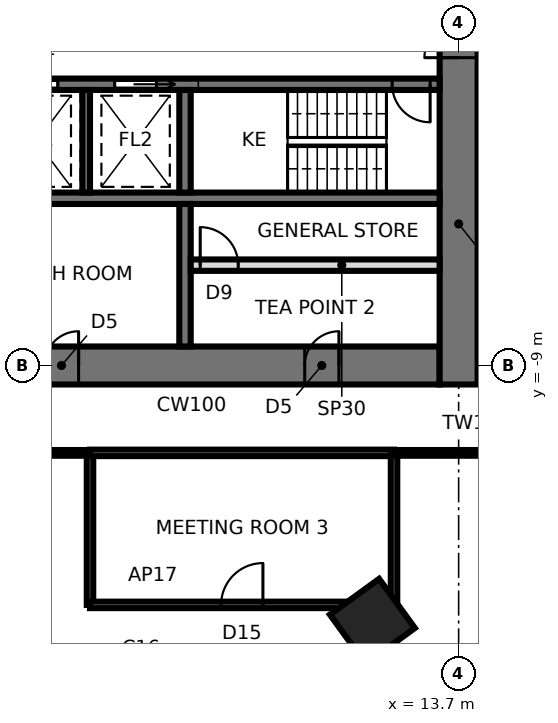
"""IFC4 building model, lengths in metres.
Left out: names, types, materials, properties, quantities, classifications, styles, units other than length and angle.
Written with IfcOpenShell. Run it as: python <this file> out.ifc"""

import sys

from ifc_helpers import new_model, si_unit, direction, frame, frame_2d, origin, origin_2d, place, context, subcontext, project, spatial, rectangle, extrude, element, fill, save


model = new_model("IFC4")
c1 = context("Model", 3, precision=1e-05, world=origin(), true_north=direction((0.0, 1.0)))
c2 = subcontext(c1, "Body", "Model", "MODEL_VIEW")
j1 = project(units=[si_unit("LENGTHUNIT", "METRE"), si_unit("PLANEANGLEUNIT", "RADIAN")], contexts=[c1])
p1 = place(None, origin())
s1 = spatial("IfcSite", under=j1, at=p1, CompositionType="ELEMENT")
p2 = place(p1, origin())
s2 = spatial("IfcBuilding", under=s1, at=p2, CompositionType="ELEMENT")
p3 = place(p2, frame((0.0, 0.0, 127.5)))
s3 = spatial("IfcBuildingStorey", under=s2, at=p3, CompositionType="ELEMENT", Elevation=127.5)
p4 = place(p3, frame((11.43, -15.733, 0.0), z_axis=(0.0, 0.0, 1.0), x_axis=(0.587785252292, -0.809016994375, 0.0)))
e1 = element("IfcColumn", 1, at=p4, inside=s3, PredefinedType="COLUMN", context=c2, shape_type="SweptSolid", body=[
    extrude(rectangle(XDim=1.6, YDim=1.6, at=origin_2d()), origin(), (0.0, 0.0, 1.0), 3.9),
])
p5 = place(p3, frame((-13.2, -9.0, 0.0), z_axis=(0.0, 0.0, 1.0), x_axis=(1.0, 0.0, 0.0)))
e2 = element("IfcWall", 2, at=p5, inside=s3, PredefinedType="SHEAR", context=c2, shape_type="SweptSolid", body=[
    extrude(rectangle(XDim=26.4, YDim=1.0, at=frame_2d((13.2, 0.0))), origin(), (0.0, 0.0, 1.0), 3.9),
])
p6 = place(p5, frame((2.65, 0.0, 0.0)))
e3 = element("IfcOpeningElement", 3, at=p6, cuts=e2, PredefinedType="OPENING", context=c2, shape_type="SweptSolid", body=[
    extrude(rectangle(XDim=0.9, YDim=2.1, at=frame_2d((0.45, 1.05))), frame((0.0, 0.51, 0.0), z_axis=(0.0, -1.0, 0.0), x_axis=(1.0, 0.0, 0.0)), (0.0, 0.0, 1.0), 1.02),
])
p7 = place(p5, frame((9.5, 0.0, 0.0)))
e4 = element("IfcOpeningElement", 4, at=p7, cuts=e2, PredefinedType="OPENING", context=c2, shape_type="SweptSolid", body=[
    extrude(rectangle(XDim=0.9, YDim=2.1, at=frame_2d((0.45, 1.05))), frame((0.0, 0.51, 0.0), z_axis=(0.0, -1.0, 0.0), x_axis=(1.0, 0.0, 0.0)), (0.0, 0.0, 1.0), 1.02),
])
p8 = place(p5, frame((16.0, 0.0, 0.0)))
e5 = element("IfcOpeningElement", 5, at=p8, cuts=e2, PredefinedType="OPENING", context=c2, shape_type="SweptSolid", body=[
    extrude(rectangle(XDim=0.9, YDim=2.1, at=frame_2d((0.45, 1.05))), frame((0.0, 0.51, 0.0), z_axis=(0.0, -1.0, 0.0), x_axis=(1.0, 0.0, 0.0)), (0.0, 0.0, 1.0), 1.02),
])
p9 = place(p5, frame((22.85, 0.0, 0.0)))
e6 = element("IfcOpeningElement", 6, at=p9, cuts=e2, PredefinedType="OPENING", context=c2, shape_type="SweptSolid", body=[
    extrude(rectangle(XDim=0.9, YDim=2.1, at=frame_2d((0.45, 1.05))), frame((0.0, 0.51, 0.0), z_axis=(0.0, -1.0, 0.0), x_axis=(1.0, 0.0, 0.0)), (0.0, 0.0, 1.0), 1.02),
])
p10 = place(p3, frame((13.7, -9.5, 0.0), z_axis=(0.0, 0.0, 1.0), x_axis=(0.0, 1.0, 0.0)))
e7 = element("IfcWall", 7, at=p10, inside=s3, PredefinedType="SHEAR", context=c2, shape_type="SweptSolid", body=[
    extrude(rectangle(XDim=19.0, YDim=1.0, at=frame_2d((9.5, 0.0))), origin(), (0.0, 0.0, 1.0), 3.9),
])
p11 = place(p10, frame((8.6, 0.0, 0.0)))
e8 = element("IfcOpeningElement", 8, at=p11, cuts=e7, PredefinedType="OPENING", context=c2, shape_type="SweptSolid", body=[
    extrude(rectangle(XDim=1.8, YDim=2.4, at=frame_2d((0.9, 1.2))), frame((0.0, 0.51, 0.0), z_axis=(0.0, -1.0, 0.0), x_axis=(1.0, 0.0, 0.0)), (0.0, 0.0, 1.0), 1.02),
])
p12 = place(p3, frame((-13.2, -1.6, 0.0), z_axis=(0.0, 0.0, 1.0), x_axis=(1.0, 0.0, 0.0)))
e9 = element("IfcWall", 9, at=p12, inside=s3, PredefinedType="SHEAR", context=c2, shape_type="SweptSolid", body=[
    extrude(rectangle(XDim=26.4, YDim=0.3, at=frame_2d((13.2, 0.0))), origin(), (0.0, 0.0, 1.0), 3.9),
])
p13 = place(p12, frame((25.15, 0.0, 0.0)))
e10 = element("IfcOpeningElement", 10, at=p13, cuts=e9, PredefinedType="OPENING", context=c2, shape_type="SweptSolid", body=[
    extrude(rectangle(XDim=1.0, YDim=2.1, at=frame_2d((0.5, 1.05))), frame((0.0, 0.16, 0.0), z_axis=(0.0, -1.0, 0.0), x_axis=(1.0, 0.0, 0.0)), (0.0, 0.0, 1.0), 0.32),
])
p14 = place(p12, frame((7.45, 0.0, 0.0)))
e11 = element("IfcOpeningElement", 11, at=p14, cuts=e9, PredefinedType="OPENING", context=c2, shape_type="SweptSolid", body=[
    extrude(rectangle(XDim=1.1, YDim=2.3, at=frame_2d((0.55, 1.15))), frame((0.0, 0.16, 0.0), z_axis=(0.0, -1.0, 0.0), x_axis=(1.0, 0.0, 0.0)), (0.0, 0.0, 1.0), 0.32),
])
p15 = place(p12, frame((10.05, 0.0, 0.0)))
e12 = element("IfcOpeningElement", 12, at=p15, cuts=e9, PredefinedType="OPENING", context=c2, shape_type="SweptSolid", body=[
    extrude(rectangle(XDim=1.1, YDim=2.3, at=frame_2d((0.55, 1.15))), frame((0.0, 0.16, 0.0), z_axis=(0.0, -1.0, 0.0), x_axis=(1.0, 0.0, 0.0)), (0.0, 0.0, 1.0), 0.32),
])
p16 = place(p12, frame((12.65, 0.0, 0.0)))
e13 = element("IfcOpeningElement", 13, at=p16, cuts=e9, PredefinedType="OPENING", context=c2, shape_type="SweptSolid", body=[
    extrude(rectangle(XDim=1.1, YDim=2.3, at=frame_2d((0.55, 1.15))), frame((0.0, 0.16, 0.0), z_axis=(0.0, -1.0, 0.0), x_axis=(1.0, 0.0, 0.0)), (0.0, 0.0, 1.0), 0.32),
])
p17 = place(p12, frame((15.25, 0.0, 0.0)))
e14 = element("IfcOpeningElement", 14, at=p17, cuts=e9, PredefinedType="OPENING", context=c2, shape_type="SweptSolid", body=[
    extrude(rectangle(XDim=1.1, YDim=2.3, at=frame_2d((0.55, 1.15))), frame((0.0, 0.16, 0.0), z_axis=(0.0, -1.0, 0.0), x_axis=(1.0, 0.0, 0.0)), (0.0, 0.0, 1.0), 0.32),
])
p18 = place(p12, frame((17.85, 0.0, 0.0)))
e15 = element("IfcOpeningElement", 15, at=p18, cuts=e9, PredefinedType="OPENING", context=c2, shape_type="SweptSolid", body=[
    extrude(rectangle(XDim=1.1, YDim=2.3, at=frame_2d((0.55, 1.15))), frame((0.0, 0.16, 0.0), z_axis=(0.0, -1.0, 0.0), x_axis=(1.0, 0.0, 0.0)), (0.0, 0.0, 1.0), 0.32),
])
p19 = place(p12, frame((5.55, 0.0, 0.0)))
e16 = element("IfcOpeningElement", 16, at=p19, cuts=e9, PredefinedType="OPENING", context=c2, shape_type="SweptSolid", body=[
    extrude(rectangle(XDim=0.9, YDim=2.1, at=frame_2d((0.45, 1.05))), frame((0.0, 0.16, 0.0), z_axis=(0.0, -1.0, 0.0), x_axis=(1.0, 0.0, 0.0)), (0.0, 0.0, 1.0), 0.32),
])
p20 = place(p3, frame((-13.2, -4.6, 0.0), z_axis=(0.0, 0.0, 1.0), x_axis=(1.0, 0.0, 0.0)))
e17 = element("IfcWall", 17, at=p20, inside=s3, PredefinedType="SHEAR", context=c2, shape_type="SweptSolid", body=[
    extrude(rectangle(XDim=26.4, YDim=0.3, at=frame_2d((13.2, 0.0))), origin(), (0.0, 0.0, 1.0), 3.9),
])
p21 = place(p3, frame((6.5, -1.75, 0.0), z_axis=(0.0, 0.0, 1.0), x_axis=(0.0, -1.0, 0.0)))
e18 = element("IfcWall", 18, at=p21, inside=s3, PredefinedType="SHEAR", context=c2, shape_type="SweptSolid", body=[
    extrude(rectangle(XDim=2.7, YDim=0.3, at=frame_2d((1.35, 0.0))), origin(), (0.0, 0.0, 1.0), 3.9),
])
p22 = place(p3, frame((6.5, -4.75, 0.0), z_axis=(0.0, 0.0, 1.0), x_axis=(0.0, -1.0, 0.0)))
e19 = element("IfcWall", 19, at=p22, inside=s3, PredefinedType="SHEAR", context=c2, shape_type="SweptSolid", body=[
    extrude(rectangle(XDim=3.75, YDim=0.3, at=frame_2d((1.875, 0.0))), origin(), (0.0, 0.0, 1.0), 3.9),
])
p23 = place(p3, frame((3.9, -1.75, 0.0), z_axis=(0.0, 0.0, 1.0), x_axis=(0.0, -1.0, 0.0)))
e20 = element("IfcWall", 20, at=p23, inside=s3, PredefinedType="SHEAR", context=c2, shape_type="SweptSolid", body=[
    extrude(rectangle(XDim=2.7, YDim=0.2, at=frame_2d((1.35, 0.0))), origin(), (0.0, 0.0, 1.0), 3.9),
])
p24 = place(p3, frame((6.65, -6.36, 0.0), z_axis=(0.0, 0.0, 1.0), x_axis=(1.0, 0.0, 0.0)))
e21 = element("IfcWall", 21, at=p24, inside=s3, PredefinedType="PARTITIONING", context=c2, shape_type="SweptSolid", body=[
    extrude(rectangle(XDim=6.55, YDim=0.3, at=frame_2d((3.275, 0.0))), origin(), (0.0, 0.0, 1.0), 3.74),
])
p25 = place(p24, frame((0.25, 0.0, 0.0)))
e22 = element("IfcOpeningElement", 22, at=p25, cuts=e21, PredefinedType="OPENING", context=c2, shape_type="SweptSolid", body=[
    extrude(rectangle(XDim=1.0, YDim=2.4, at=frame_2d((0.5, 1.2))), frame((0.0, 0.16, 0.0), z_axis=(0.0, -1.0, 0.0), x_axis=(1.0, 0.0, 0.0)), (0.0, 0.0, 1.0), 0.32),
])
p26 = place(p3, frame((0.5, -11.3, 0.0), z_axis=(0.0, 0.0, 1.0), x_axis=(1.0, 0.0, 0.0)))
e23 = element("IfcWall", 23, at=p26, inside=s3, PredefinedType="PARTITIONING", context=c2, shape_type="SweptSolid", body=[
    extrude(rectangle(XDim=3.5, YDim=0.15, at=frame_2d((1.75, 0.0))), origin(), (0.0, 0.0, 1.0), 3.74),
])
p27 = place(p3, frame((4.0, -11.3, 0.0), z_axis=(0.0, 0.0, 1.0), x_axis=(0.0, -1.0, 0.0)))
e24 = element("IfcWall", 24, at=p27, inside=s3, PredefinedType="PARTITIONING", context=c2, shape_type="SweptSolid", body=[
    extrude(rectangle(XDim=4.0, YDim=0.17, at=frame_2d((2.0, 0.0))), origin(), (0.0, 0.0, 1.0), 3.74),
])
p28 = place(p3, frame((4.0, -15.3, 0.0), z_axis=(0.0, 0.0, 1.0), x_axis=(1.0, 0.0, 0.0)))
e25 = element("IfcWall", 25, at=p28, inside=s3, PredefinedType="PARTITIONING", context=c2, shape_type="SweptSolid", body=[
    extrude(rectangle(XDim=8.0, YDim=0.17, at=frame_2d((4.0, 0.0))), origin(), (0.0, 0.0, 1.0), 3.286),
])
p29 = place(p28, frame((3.45, 0.0, 0.0)))
e26 = element("IfcOpeningElement", 26, at=p29, cuts=e25, PredefinedType="OPENING", context=c2, shape_type="SweptSolid", body=[
    extrude(rectangle(XDim=1.1, YDim=2.4, at=frame_2d((0.55, 1.2))), frame((0.0, 0.095, 0.0), z_axis=(0.0, -1.0, 0.0), x_axis=(1.0, 0.0, 0.0)), (0.0, 0.0, 1.0), 0.19),
])
p30 = place(p3, frame((12.0, -11.3, 0.0), z_axis=(0.0, 0.0, 1.0), x_axis=(-1.0, 0.0, 0.0)))
e27 = element("IfcWall", 27, at=p30, inside=s3, PredefinedType="PARTITIONING", context=c2, shape_type="SweptSolid", body=[
    extrude(rectangle(XDim=8.0, YDim=0.17, at=frame_2d((4.0, 0.0))), origin(), (0.0, 0.0, 1.0), 3.74),
])
p31 = place(p3, frame((12.0, -15.3, 0.0), z_axis=(0.0, 0.0, 1.0), x_axis=(0.0, 1.0, 0.0)))
e28 = element("IfcWall", 28, at=p31, inside=s3, PredefinedType="PARTITIONING", context=c2, shape_type="SweptSolid", body=[
    extrude(rectangle(XDim=4.0, YDim=0.17, at=frame_2d((2.0, 0.0))), origin(), (0.0, 0.0, 1.0), 3.74),
])
p32 = place(p3, frame((12.0, -11.3, 0.0), z_axis=(0.0, 0.0, 1.0), x_axis=(1.0, 0.0, 0.0)))
e29 = element("IfcWall", 29, at=p32, inside=s3, PredefinedType="PARTITIONING", context=c2, shape_type="SweptSolid", body=[
    extrude(rectangle(XDim=4.0, YDim=0.15, at=frame_2d((2.0, 0.0))), origin(), (0.0, 0.0, 1.0), 3.74),
])
p33 = place(p11, origin())
e30 = element("IfcDoor", 30, at=p33, inside=s3, OperationType="DOUBLE_DOOR_SINGLE_SWING", PredefinedType="DOOR", context=c2, shape_type="SweptSolid", body=[
    extrude(rectangle(XDim=1.72, YDim=2.36, at=frame_2d((0.9, 1.18))), frame((0.0, 0.025, 0.0), z_axis=(0.0, -1.0, 0.0), x_axis=(1.0, 0.0, 0.0)), (0.0, 0.0, 1.0), 0.05),
    extrude(rectangle(XDim=0.04, YDim=2.4, at=frame_2d((0.02, 1.2))), frame((0.0, 0.25, 0.0), z_axis=(0.0, -1.0, 0.0), x_axis=(1.0, 0.0, 0.0)), (0.0, 0.0, 1.0), 0.5),
    extrude(rectangle(XDim=0.04, YDim=2.4, at=frame_2d((1.78, 1.2))), frame((0.0, 0.25, 0.0), z_axis=(0.0, -1.0, 0.0), x_axis=(1.0, 0.0, 0.0)), (0.0, 0.0, 1.0), 0.5),
    extrude(rectangle(XDim=1.72, YDim=0.04, at=frame_2d((0.9, 2.38))), frame((0.0, 0.25, 0.0), z_axis=(0.0, -1.0, 0.0), x_axis=(1.0, 0.0, 0.0)), (0.0, 0.0, 1.0), 0.5),
])
fill(e8, e30)
p34 = place(p13, frame((1.0, 0.0, 0.0), z_axis=(0.0, 0.0, 1.0), x_axis=(-1.0, 0.0, 0.0)))
e31 = element("IfcDoor", 31, at=p34, inside=s3, OperationType="SINGLE_SWING_LEFT", PredefinedType="DOOR", context=c2, shape_type="SweptSolid", body=[
    extrude(rectangle(XDim=1.0, YDim=2.1, at=frame_2d((0.5, 1.05))), frame((0.0, 0.025, 0.0), z_axis=(0.0, -1.0, 0.0), x_axis=(1.0, 0.0, 0.0)), (0.0, 0.0, 1.0), 0.05),
])
fill(e10, e31)
p35 = place(p17, frame((1.1, 0.0, 0.0), z_axis=(0.0, 0.0, 1.0), x_axis=(-1.0, 0.0, 0.0)))
e32 = element("IfcDoor", 32, at=p35, inside=s3, OperationType="SLIDING_TO_RIGHT", PredefinedType="DOOR", context=c2, shape_type="SweptSolid", body=[
    extrude(rectangle(XDim=1.1, YDim=2.3, at=frame_2d((0.55, 1.15))), frame((0.0, 0.025, 0.0), z_axis=(0.0, -1.0, 0.0), x_axis=(1.0, 0.0, 0.0)), (0.0, 0.0, 1.0), 0.05),
])
fill(e14, e32)
p36 = place(p18, frame((1.1, 0.0, 0.0), z_axis=(0.0, 0.0, 1.0), x_axis=(-1.0, 0.0, 0.0)))
e33 = element("IfcDoor", 33, at=p36, inside=s3, OperationType="SLIDING_TO_LEFT", PredefinedType="DOOR", context=c2, shape_type="SweptSolid", body=[
    extrude(rectangle(XDim=1.1, YDim=2.3, at=frame_2d((0.55, 1.15))), frame((0.0, 0.025, 0.0), z_axis=(0.0, -1.0, 0.0), x_axis=(1.0, 0.0, 0.0)), (0.0, 0.0, 1.0), 0.05),
])
fill(e15, e33)
p37 = place(p8, origin())
e34 = element("IfcDoor", 34, at=p37, inside=s3, OperationType="SINGLE_SWING_RIGHT", PredefinedType="DOOR", context=c2, shape_type="SweptSolid", body=[
    extrude(rectangle(XDim=0.82, YDim=2.06, at=frame_2d((0.45, 1.03))), frame((0.0, 0.025, 0.0), z_axis=(0.0, -1.0, 0.0), x_axis=(1.0, 0.0, 0.0)), (0.0, 0.0, 1.0), 0.05),
    extrude(rectangle(XDim=0.04, YDim=2.1, at=frame_2d((0.02, 1.05))), frame((0.0, 0.25, 0.0), z_axis=(0.0, -1.0, 0.0), x_axis=(1.0, 0.0, 0.0)), (0.0, 0.0, 1.0), 0.5),
    extrude(rectangle(XDim=0.04, YDim=2.1, at=frame_2d((0.88, 1.05))), frame((0.0, 0.25, 0.0), z_axis=(0.0, -1.0, 0.0), x_axis=(1.0, 0.0, 0.0)), (0.0, 0.0, 1.0), 0.5),
    extrude(rectangle(XDim=0.82, YDim=0.04, at=frame_2d((0.45, 2.08))), frame((0.0, 0.25, 0.0), z_axis=(0.0, -1.0, 0.0), x_axis=(1.0, 0.0, 0.0)), (0.0, 0.0, 1.0), 0.5),
])
fill(e5, e34)
p38 = place(p9, origin())
e35 = element("IfcDoor", 35, at=p38, inside=s3, OperationType="SINGLE_SWING_RIGHT", PredefinedType="DOOR", context=c2, shape_type="SweptSolid", body=[
    extrude(rectangle(XDim=0.82, YDim=2.06, at=frame_2d((0.45, 1.03))), frame((0.0, 0.025, 0.0), z_axis=(0.0, -1.0, 0.0), x_axis=(1.0, 0.0, 0.0)), (0.0, 0.0, 1.0), 0.05),
    extrude(rectangle(XDim=0.04, YDim=2.1, at=frame_2d((0.02, 1.05))), frame((0.0, 0.25, 0.0), z_axis=(0.0, -1.0, 0.0), x_axis=(1.0, 0.0, 0.0)), (0.0, 0.0, 1.0), 0.5),
    extrude(rectangle(XDim=0.04, YDim=2.1, at=frame_2d((0.88, 1.05))), frame((0.0, 0.25, 0.0), z_axis=(0.0, -1.0, 0.0), x_axis=(1.0, 0.0, 0.0)), (0.0, 0.0, 1.0), 0.5),
    extrude(rectangle(XDim=0.82, YDim=0.04, at=frame_2d((0.45, 2.08))), frame((0.0, 0.25, 0.0), z_axis=(0.0, -1.0, 0.0), x_axis=(1.0, 0.0, 0.0)), (0.0, 0.0, 1.0), 0.5),
])
fill(e6, e35)
p39 = place(p25, origin())
e36 = element("IfcDoor", 36, at=p39, inside=s3, OperationType="SINGLE_SWING_LEFT", PredefinedType="DOOR", context=c2, shape_type="SweptSolid", body=[
    extrude(rectangle(XDim=1.0, YDim=2.4, at=frame_2d((0.5, 1.2))), frame((0.0, 0.025, 0.0), z_axis=(0.0, -1.0, 0.0), x_axis=(1.0, 0.0, 0.0)), (0.0, 0.0, 1.0), 0.05),
])
fill(e22, e36)
p40 = place(p29, origin())
e37 = element("IfcDoor", 37, at=p40, inside=s3, OperationType="SINGLE_SWING_RIGHT", PredefinedType="DOOR", context=c2, shape_type="SweptSolid", body=[
    extrude(rectangle(XDim=1.1, YDim=2.4, at=frame_2d((0.55, 1.2))), frame((0.0, 0.025, 0.0), z_axis=(0.0, -1.0, 0.0), x_axis=(1.0, 0.0, 0.0)), (0.0, 0.0, 1.0), 0.05),
])
fill(e26, e37)
save(model, sys.argv[1])
